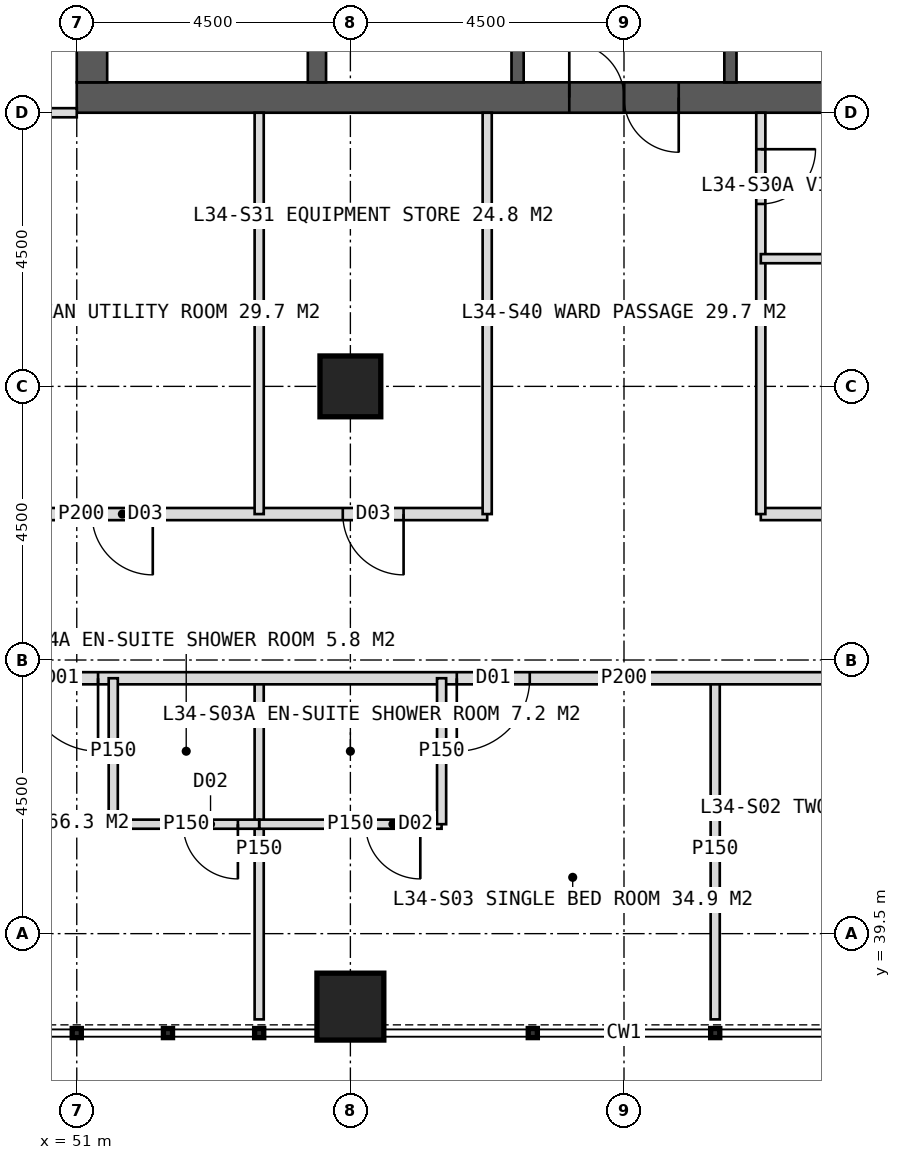
"""IFC4 building model, lengths in metres.
Left out: names, types, materials, properties, quantities, classifications, styles, units other than length and angle.
Written with IfcOpenShell. Run it as: python <this file> out.ifc"""

import sys

from ifc_helpers import new_model, si_unit, direction, frame, frame_2d, origin, origin_2d, place, context, subcontext, project, spatial, rectangle, hollow_rectangle, extrude, element, fill, save


model = new_model("IFC4")
c1 = context("Model", 3, precision=1e-05, world=origin(), true_north=direction((0.0, 1.0)))
c2 = subcontext(c1, "Body", "Model", "MODEL_VIEW")
j1 = project(units=[si_unit("LENGTHUNIT", "METRE"), si_unit("PLANEANGLEUNIT", "RADIAN")], contexts=[c1])
p1 = place(None, origin())
s1 = spatial("IfcSite", under=j1, at=p1, CompositionType="ELEMENT")
p2 = place(p1, origin())
s2 = spatial("IfcBuilding", under=s1, at=p2, CompositionType="ELEMENT")
p3 = place(p2, frame((0.0, 0.0, 144.0)))
s3 = spatial("IfcBuildingStorey", under=s2, at=p3, CompositionType="ELEMENT", Elevation=144.0)
p4 = place(p3, frame((51.0, 53.25, 0.0), z_axis=(0.0, 0.0, 1.0), x_axis=(1.0, 0.0, 0.0)))
e1 = element("IfcWall", 1, at=p4, inside=s3, PredefinedType="SHEAR", context=c2, shape_type="SweptSolid", body=[
    extrude(rectangle(XDim=18.0, YDim=0.5, at=frame_2d((9.0, 0.0))), origin(), (0.0, 0.0, 1.0), 4.0),
])
p5 = place(p4, frame((8.1, 0.0, 0.0)))
e2 = element("IfcOpeningElement", 2, at=p5, cuts=e1, PredefinedType="OPENING", context=c2, shape_type="SweptSolid", body=[
    extrude(rectangle(XDim=1.8, YDim=2.2, at=frame_2d((0.9, 1.1))), frame((0.0, 0.26, 0.0), z_axis=(0.0, -1.0, 0.0), x_axis=(1.0, 0.0, 0.0)), (0.0, 0.0, 1.0), 0.52),
])
p6 = place(p3, frame((51.25, 53.5, 0.0), z_axis=(0.0, 0.0, 1.0), x_axis=(0.0, 1.0, 0.0)))
e3 = element("IfcWall", 3, at=p6, inside=s3, PredefinedType="SHEAR", context=c2, shape_type="SweptSolid", body=[
    extrude(rectangle(XDim=17.0, YDim=0.5, at=frame_2d((8.5, 0.0))), origin(), (0.0, 0.0, 1.0), 4.0),
])
p7 = place(p6, frame((6.0, 0.0, 0.0)))
e4 = element("IfcOpeningElement", 4, at=p7, cuts=e3, PredefinedType="OPENING", context=c2, shape_type="SweptSolid", body=[
    extrude(rectangle(XDim=1.5, YDim=2.2, at=frame_2d((0.75, 1.1))), frame((0.0, 0.26, 0.0), z_axis=(0.0, -1.0, 0.0), x_axis=(1.0, 0.0, 0.0)), (0.0, 0.0, 1.0), 0.52),
])
p8 = place(p3, frame((54.95, 53.5, 0.0), z_axis=(0.0, 0.0, 1.0), x_axis=(0.0, 1.0, 0.0)))
e5 = element("IfcWall", 5, at=p8, inside=s3, PredefinedType="SHEAR", context=c2, shape_type="SweptSolid", body=[
    extrude(rectangle(XDim=17.0, YDim=0.3, at=frame_2d((8.5, 0.0))), origin(), (0.0, 0.0, 1.0), 4.0),
])
p9 = place(p3, frame((58.25, 53.5, 0.0), z_axis=(0.0, 0.0, 1.0), x_axis=(0.0, 1.0, 0.0)))
e6 = element("IfcWall", 6, at=p9, inside=s3, PredefinedType="SHEAR", context=c2, shape_type="SweptSolid", body=[
    extrude(rectangle(XDim=17.0, YDim=0.2, at=frame_2d((8.5, 0.0))), origin(), (0.0, 0.0, 1.0), 4.0),
])
p10 = place(p9, frame((1.375, 0.0, 0.0)))
e7 = element("IfcOpeningElement", 7, at=p10, cuts=e6, PredefinedType="OPENING", context=c2, shape_type="SweptSolid", body=[
    extrude(rectangle(XDim=1.4, YDim=2.2, at=frame_2d((0.7, 1.1))), frame((0.0, 0.11, 0.0), z_axis=(0.0, -1.0, 0.0), x_axis=(1.0, 0.0, 0.0)), (0.0, 0.0, 1.0), 0.22),
])
p11 = place(p9, frame((5.675, 0.0, 0.0)))
e8 = element("IfcOpeningElement", 8, at=p11, cuts=e6, PredefinedType="OPENING", context=c2, shape_type="SweptSolid", body=[
    extrude(rectangle(XDim=1.4, YDim=2.2, at=frame_2d((0.7, 1.1))), frame((0.0, 0.11, 0.0), z_axis=(0.0, -1.0, 0.0), x_axis=(1.0, 0.0, 0.0)), (0.0, 0.0, 1.0), 0.22),
])
p12 = place(p3, frame((61.75, 53.5, 0.0), z_axis=(0.0, 0.0, 1.0), x_axis=(0.0, 1.0, 0.0)))
e9 = element("IfcWall", 9, at=p12, inside=s3, PredefinedType="SHEAR", context=c2, shape_type="SweptSolid", body=[
    extrude(rectangle(XDim=17.0, YDim=0.2, at=frame_2d((8.5, 0.0))), origin(), (0.0, 0.0, 1.0), 4.0),
])
p13 = place(p12, frame((1.375, 0.0, 0.0)))
e10 = element("IfcOpeningElement", 10, at=p13, cuts=e9, PredefinedType="OPENING", context=c2, shape_type="SweptSolid", body=[
    extrude(rectangle(XDim=1.4, YDim=2.2, at=frame_2d((0.7, 1.1))), frame((0.0, 0.11, 0.0), z_axis=(0.0, -1.0, 0.0), x_axis=(1.0, 0.0, 0.0)), (0.0, 0.0, 1.0), 0.22),
])
p14 = place(p12, frame((5.675, 0.0, 0.0)))
e11 = element("IfcOpeningElement", 11, at=p14, cuts=e9, PredefinedType="OPENING", context=c2, shape_type="SweptSolid", body=[
    extrude(rectangle(XDim=1.4, YDim=2.2, at=frame_2d((0.7, 1.1))), frame((0.0, 0.11, 0.0), z_axis=(0.0, -1.0, 0.0), x_axis=(1.0, 0.0, 0.0)), (0.0, 0.0, 1.0), 0.22),
])
p15 = place(p3, frame((55.5, 48.5, 0.0), z_axis=(0.0, 0.0, 1.0), x_axis=(1.0, 0.0, 0.0)))
e12 = element("IfcColumn", 12, at=p15, inside=s3, PredefinedType="COLUMN", context=c2, shape_type="SweptSolid", body=[
    extrude(hollow_rectangle(XDim=1.0, YDim=1.0, WallThickness=0.1, at=origin_2d()), origin(), (0.0, 0.0, 1.0), 4.0),
])
p16 = place(p3, frame((55.5, 38.3, 0.0), z_axis=(0.0, 0.0, 1.0), x_axis=(1.0, 0.0, 0.0)))
e13 = element("IfcColumn", 13, at=p16, inside=s3, PredefinedType="COLUMN", context=c2, shape_type="SweptSolid", body=[
    extrude(hollow_rectangle(XDim=1.1, YDim=1.1, WallThickness=0.1, at=origin_2d()), origin(), (0.0, 0.0, 1.0), 4.0),
])
p17 = place(p3, frame((51.0, 53.0, 0.0), z_axis=(0.0, 0.0, 1.0), x_axis=(-1.0, 0.0, 0.0)))
e14 = element("IfcWall", 14, at=p17, inside=s3, PredefinedType="PARTITIONING", context=c2, shape_type="SweptSolid", body=[
    extrude(rectangle(XDim=6.6, YDim=0.15, at=frame_2d((3.3, 0.0))), origin(), (0.0, 0.0, 1.0), 3.75),
])
for number, where, z_axis, x_axis in (
    (15, (61.5, 43.7, 0.0), (0.0, 0.0, 1.0), (0.0, -1.0, 0.0)),
    (16, (54.0, 43.7, 0.0), (0.0, 0.0, 1.0), (0.0, -1.0, 0.0)),
):
    element("IfcWall", number, at=place(p3, frame(where, z_axis=z_axis, x_axis=x_axis)), inside=s3, PredefinedType="PARTITIONING", context=c2, shape_type="SweptSolid", body=[
        extrude(rectangle(XDim=5.61, YDim=0.15, at=frame_2d((2.805, 0.0))), origin(), (0.0, 0.0, 1.0), 3.75),
    ])
p18 = place(p3, frame((78.3, 43.7, 0.0), z_axis=(0.0, 0.0, 1.0), x_axis=(-1.0, 0.0, 0.0)))
e17 = element("IfcWall", 17, at=p18, inside=s3, PredefinedType="PARTITIONING", context=c2, shape_type="SweptSolid", body=[
    extrude(rectangle(XDim=36.6, YDim=0.2, at=frame_2d((18.3, 0.0))), origin(), (0.0, 0.0, 1.0), 3.75),
])
p19 = place(p18, frame((3.35, 0.0, 0.0)))
e18 = element("IfcOpeningElement", 18, at=p19, cuts=e17, PredefinedType="OPENING", context=c2, shape_type="SweptSolid", body=[
    extrude(rectangle(XDim=1.2, YDim=2.2, at=frame_2d((0.6, 1.1))), frame((0.0, 0.11, 0.0), z_axis=(0.0, -1.0, 0.0), x_axis=(1.0, 0.0, 0.0)), (0.0, 0.0, 1.0), 0.22),
])
p20 = place(p18, frame((11.05, 0.0, 0.0)))
e19 = element("IfcOpeningElement", 19, at=p20, cuts=e17, PredefinedType="OPENING", context=c2, shape_type="SweptSolid", body=[
    extrude(rectangle(XDim=1.2, YDim=2.2, at=frame_2d((0.6, 1.1))), frame((0.0, 0.11, 0.0), z_axis=(0.0, -1.0, 0.0), x_axis=(1.0, 0.0, 0.0)), (0.0, 0.0, 1.0), 0.22),
])
p21 = place(p18, frame((19.85, 0.0, 0.0)))
e20 = element("IfcOpeningElement", 20, at=p21, cuts=e17, PredefinedType="OPENING", context=c2, shape_type="SweptSolid", body=[
    extrude(rectangle(XDim=1.2, YDim=2.2, at=frame_2d((0.6, 1.1))), frame((0.0, 0.11, 0.0), z_axis=(0.0, -1.0, 0.0), x_axis=(1.0, 0.0, 0.0)), (0.0, 0.0, 1.0), 0.22),
])
p22 = place(p18, frame((26.95, 0.0, 0.0)))
e21 = element("IfcOpeningElement", 21, at=p22, cuts=e17, PredefinedType="OPENING", context=c2, shape_type="SweptSolid", body=[
    extrude(rectangle(XDim=1.2, YDim=2.2, at=frame_2d((0.6, 1.1))), frame((0.0, 0.11, 0.0), z_axis=(0.0, -1.0, 0.0), x_axis=(1.0, 0.0, 0.0)), (0.0, 0.0, 1.0), 0.22),
])
p23 = place(p3, frame((57.0, 41.3, 0.0), z_axis=(0.0, 0.0, 1.0), x_axis=(-1.0, 0.0, 0.0)))
e22 = element("IfcWall", 22, at=p23, inside=s3, PredefinedType="PARTITIONING", context=c2, shape_type="SweptSolid", body=[
    extrude(rectangle(XDim=3.0, YDim=0.15, at=frame_2d((1.5, 0.0))), origin(), (0.0, 0.0, 1.0), 3.75),
])
p24 = place(p23, frame((0.35, 0.0, 0.0)))
e23 = element("IfcOpeningElement", 23, at=p24, cuts=e22, PredefinedType="OPENING", context=c2, shape_type="SweptSolid", body=[
    extrude(rectangle(XDim=0.9, YDim=2.1, at=frame_2d((0.45, 1.05))), frame((0.0, 0.085, 0.0), z_axis=(0.0, -1.0, 0.0), x_axis=(1.0, 0.0, 0.0)), (0.0, 0.0, 1.0), 0.17),
])
p25 = place(p3, frame((57.0, 43.7, 0.0), z_axis=(0.0, 0.0, 1.0), x_axis=(0.0, -1.0, 0.0)))
e24 = element("IfcWall", 24, at=p25, inside=s3, PredefinedType="PARTITIONING", context=c2, shape_type="SweptSolid", body=[
    extrude(rectangle(XDim=2.4, YDim=0.15, at=frame_2d((1.2, 0.0))), origin(), (0.0, 0.0, 1.0), 3.75),
])
p26 = place(p3, frame((54.0, 41.3, 0.0), z_axis=(0.0, 0.0, 1.0), x_axis=(-1.0, 0.0, 0.0)))
e25 = element("IfcWall", 25, at=p26, inside=s3, PredefinedType="PARTITIONING", context=c2, shape_type="SweptSolid", body=[
    extrude(rectangle(XDim=2.4, YDim=0.15, at=frame_2d((1.2, 0.0))), origin(), (0.0, 0.0, 1.0), 3.75),
])
p27 = place(p26, frame((0.35, 0.0, 0.0)))
e26 = element("IfcOpeningElement", 26, at=p27, cuts=e25, PredefinedType="OPENING", context=c2, shape_type="SweptSolid", body=[
    extrude(rectangle(XDim=0.9, YDim=2.1, at=frame_2d((0.45, 1.05))), frame((0.0, 0.085, 0.0), z_axis=(0.0, -1.0, 0.0), x_axis=(1.0, 0.0, 0.0)), (0.0, 0.0, 1.0), 0.17),
])
p28 = place(p3, frame((51.6, 43.7, 0.0), z_axis=(0.0, 0.0, 1.0), x_axis=(0.0, -1.0, 0.0)))
e27 = element("IfcWall", 27, at=p28, inside=s3, PredefinedType="PARTITIONING", context=c2, shape_type="SweptSolid", body=[
    extrude(rectangle(XDim=2.4, YDim=0.15, at=frame_2d((1.2, 0.0))), origin(), (0.0, 0.0, 1.0), 3.75),
])
p29 = place(p3, frame((75.6, 46.4, 0.0), z_axis=(0.0, 0.0, 1.0), x_axis=(-1.0, 0.0, 0.0)))
e28 = element("IfcWall", 28, at=p29, inside=s3, PredefinedType="PARTITIONING", context=c2, shape_type="SweptSolid", body=[
    extrude(rectangle(XDim=13.35, YDim=0.2, at=frame_2d((6.675, 0.0))), origin(), (0.0, 0.0, 1.0), 3.75),
])
p30 = place(p29, frame((9.475, 0.0, 0.0)))
e29 = element("IfcOpeningElement", 29, at=p30, cuts=e28, PredefinedType="OPENING", context=c2, shape_type="SweptSolid", body=[
    extrude(rectangle(XDim=1.0, YDim=2.1, at=frame_2d((0.5, 1.05))), frame((0.0, 0.11, 0.0), z_axis=(0.0, -1.0, 0.0), x_axis=(1.0, 0.0, 0.0)), (0.0, 0.0, 1.0), 0.22),
])
p31 = place(p3, frame((57.75, 46.4, 0.0), z_axis=(0.0, 0.0, 1.0), x_axis=(-1.0, 0.0, 0.0)))
e30 = element("IfcWall", 30, at=p31, inside=s3, PredefinedType="PARTITIONING", context=c2, shape_type="SweptSolid", body=[
    extrude(rectangle(XDim=13.35, YDim=0.2, at=frame_2d((6.675, 0.0))), origin(), (0.0, 0.0, 1.0), 3.75),
])
p32 = place(p31, frame((1.375, 0.0, 0.0)))
e31 = element("IfcOpeningElement", 31, at=p32, cuts=e30, PredefinedType="OPENING", context=c2, shape_type="SweptSolid", body=[
    extrude(rectangle(XDim=1.0, YDim=2.1, at=frame_2d((0.5, 1.05))), frame((0.0, 0.11, 0.0), z_axis=(0.0, -1.0, 0.0), x_axis=(1.0, 0.0, 0.0)), (0.0, 0.0, 1.0), 0.22),
])
p33 = place(p31, frame((5.5, 0.0, 0.0)))
e32 = element("IfcOpeningElement", 32, at=p33, cuts=e30, PredefinedType="OPENING", context=c2, shape_type="SweptSolid", body=[
    extrude(rectangle(XDim=1.0, YDim=2.1, at=frame_2d((0.5, 1.05))), frame((0.0, 0.11, 0.0), z_axis=(0.0, -1.0, 0.0), x_axis=(1.0, 0.0, 0.0)), (0.0, 0.0, 1.0), 0.22),
])
p34 = place(p31, frame((10.3, 0.0, 0.0)))
e33 = element("IfcOpeningElement", 33, at=p34, cuts=e30, PredefinedType="OPENING", context=c2, shape_type="SweptSolid", body=[
    extrude(rectangle(XDim=1.0, YDim=2.1, at=frame_2d((0.5, 1.05))), frame((0.0, 0.11, 0.0), z_axis=(0.0, -1.0, 0.0), x_axis=(1.0, 0.0, 0.0)), (0.0, 0.0, 1.0), 0.22),
])
p35 = place(p3, frame((62.25, 53.0, 0.0), z_axis=(0.0, 0.0, 1.0), x_axis=(0.0, -1.0, 0.0)))
e34 = element("IfcWall", 34, at=p35, inside=s3, PredefinedType="PARTITIONING", context=c2, shape_type="SweptSolid", body=[
    extrude(rectangle(XDim=6.6, YDim=0.15, at=frame_2d((3.3, 0.0))), origin(), (0.0, 0.0, 1.0), 3.75),
])
p36 = place(p35, frame((0.6, 0.0, 0.0)))
e35 = element("IfcOpeningElement", 35, at=p36, cuts=e34, PredefinedType="OPENING", context=c2, shape_type="SweptSolid", body=[
    extrude(rectangle(XDim=0.9, YDim=2.1, at=frame_2d((0.45, 1.05))), frame((0.0, 0.085, 0.0), z_axis=(0.0, -1.0, 0.0), x_axis=(1.0, 0.0, 0.0)), (0.0, 0.0, 1.0), 0.17),
])
for number, where, z_axis, x_axis in (
    (36, (57.75, 53.0, 0.0), (0.0, 0.0, 1.0), (0.0, -1.0, 0.0)),
    (37, (54.0, 53.0, 0.0), (0.0, 0.0, 1.0), (0.0, -1.0, 0.0)),
):
    element("IfcWall", number, at=place(p3, frame(where, z_axis=z_axis, x_axis=x_axis)), inside=s3, PredefinedType="PARTITIONING", context=c2, shape_type="SweptSolid", body=[
        extrude(rectangle(XDim=6.6, YDim=0.15, at=frame_2d((3.3, 0.0))), origin(), (0.0, 0.0, 1.0), 3.75),
    ])
p37 = place(p3, frame((65.25, 50.6, 0.0), z_axis=(0.0, 0.0, 1.0), x_axis=(-1.0, 0.0, 0.0)))
e38 = element("IfcWall", 38, at=p37, inside=s3, PredefinedType="PARTITIONING", context=c2, shape_type="SweptSolid", body=[
    extrude(rectangle(XDim=3.0, YDim=0.15, at=frame_2d((1.5, 0.0))), origin(), (0.0, 0.0, 1.0), 3.75),
])
p38 = place(p21, origin())
e39 = element("IfcDoor", 39, at=p38, inside=s3, OperationType="SINGLE_SWING_RIGHT", PredefinedType="DOOR", context=c2, shape_type="SweptSolid", body=[
    extrude(rectangle(XDim=1.2, YDim=2.2, at=frame_2d((0.6, 1.1))), frame((0.0, 0.025, 0.0), z_axis=(0.0, -1.0, 0.0), x_axis=(1.0, 0.0, 0.0)), (0.0, 0.0, 1.0), 0.05),
])
fill(e20, e39)
p39 = place(p24, origin())
e40 = element("IfcDoor", 40, at=p39, inside=s3, OperationType="SINGLE_SWING_LEFT", PredefinedType="DOOR", context=c2, shape_type="SweptSolid", body=[
    extrude(rectangle(XDim=0.9, YDim=2.1, at=frame_2d((0.45, 1.05))), frame((0.0, 0.025, 0.0), z_axis=(0.0, -1.0, 0.0), x_axis=(1.0, 0.0, 0.0)), (0.0, 0.0, 1.0), 0.05),
])
fill(e23, e40)
p40 = place(p22, origin())
e41 = element("IfcDoor", 41, at=p40, inside=s3, OperationType="SINGLE_SWING_LEFT", PredefinedType="DOOR", context=c2, shape_type="SweptSolid", body=[
    extrude(rectangle(XDim=1.2, YDim=2.2, at=frame_2d((0.6, 1.1))), frame((0.0, 0.025, 0.0), z_axis=(0.0, -1.0, 0.0), x_axis=(1.0, 0.0, 0.0)), (0.0, 0.0, 1.0), 0.05),
])
fill(e21, e41)
p41 = place(p27, origin())
e42 = element("IfcDoor", 42, at=p41, inside=s3, OperationType="SINGLE_SWING_LEFT", PredefinedType="DOOR", context=c2, shape_type="SweptSolid", body=[
    extrude(rectangle(XDim=0.9, YDim=2.1, at=frame_2d((0.45, 1.05))), frame((0.0, 0.025, 0.0), z_axis=(0.0, -1.0, 0.0), x_axis=(1.0, 0.0, 0.0)), (0.0, 0.0, 1.0), 0.05),
])
fill(e26, e42)
p42 = place(p36, origin())
e43 = element("IfcDoor", 43, at=p42, inside=s3, OperationType="SINGLE_SWING_LEFT", PredefinedType="DOOR", context=c2, shape_type="SweptSolid", body=[
    extrude(rectangle(XDim=0.9, YDim=2.1, at=frame_2d((0.45, 1.05))), frame((0.0, 0.025, 0.0), z_axis=(0.0, -1.0, 0.0), x_axis=(1.0, 0.0, 0.0)), (0.0, 0.0, 1.0), 0.05),
])
fill(e35, e43)
p43 = place(p32, origin())
e44 = element("IfcDoor", 44, at=p43, inside=s3, OperationType="SINGLE_SWING_LEFT", PredefinedType="DOOR", context=c2, shape_type="SweptSolid", body=[
    extrude(rectangle(XDim=1.0, YDim=2.1, at=frame_2d((0.5, 1.05))), frame((0.0, 0.025, 0.0), z_axis=(0.0, -1.0, 0.0), x_axis=(1.0, 0.0, 0.0)), (0.0, 0.0, 1.0), 0.05),
])
fill(e31, e44)
p44 = place(p33, origin())
e45 = element("IfcDoor", 45, at=p44, inside=s3, OperationType="SINGLE_SWING_LEFT", PredefinedType="DOOR", context=c2, shape_type="SweptSolid", body=[
    extrude(rectangle(XDim=1.0, YDim=2.1, at=frame_2d((0.5, 1.05))), frame((0.0, 0.025, 0.0), z_axis=(0.0, -1.0, 0.0), x_axis=(1.0, 0.0, 0.0)), (0.0, 0.0, 1.0), 0.05),
])
fill(e32, e45)
p45 = place(p5, origin())
e46 = element("IfcDoor", 46, at=p45, inside=s3, OperationType="DOUBLE_DOOR_SINGLE_SWING", PredefinedType="DOOR", context=c2, shape_type="SweptSolid", body=[
    extrude(rectangle(XDim=1.8, YDim=2.2, at=frame_2d((0.9, 1.1))), frame((0.0, 0.025, 0.0), z_axis=(0.0, -1.0, 0.0), x_axis=(1.0, 0.0, 0.0)), (0.0, 0.0, 1.0), 0.05),
])
fill(e2, e46)
save(model, sys.argv[1])
